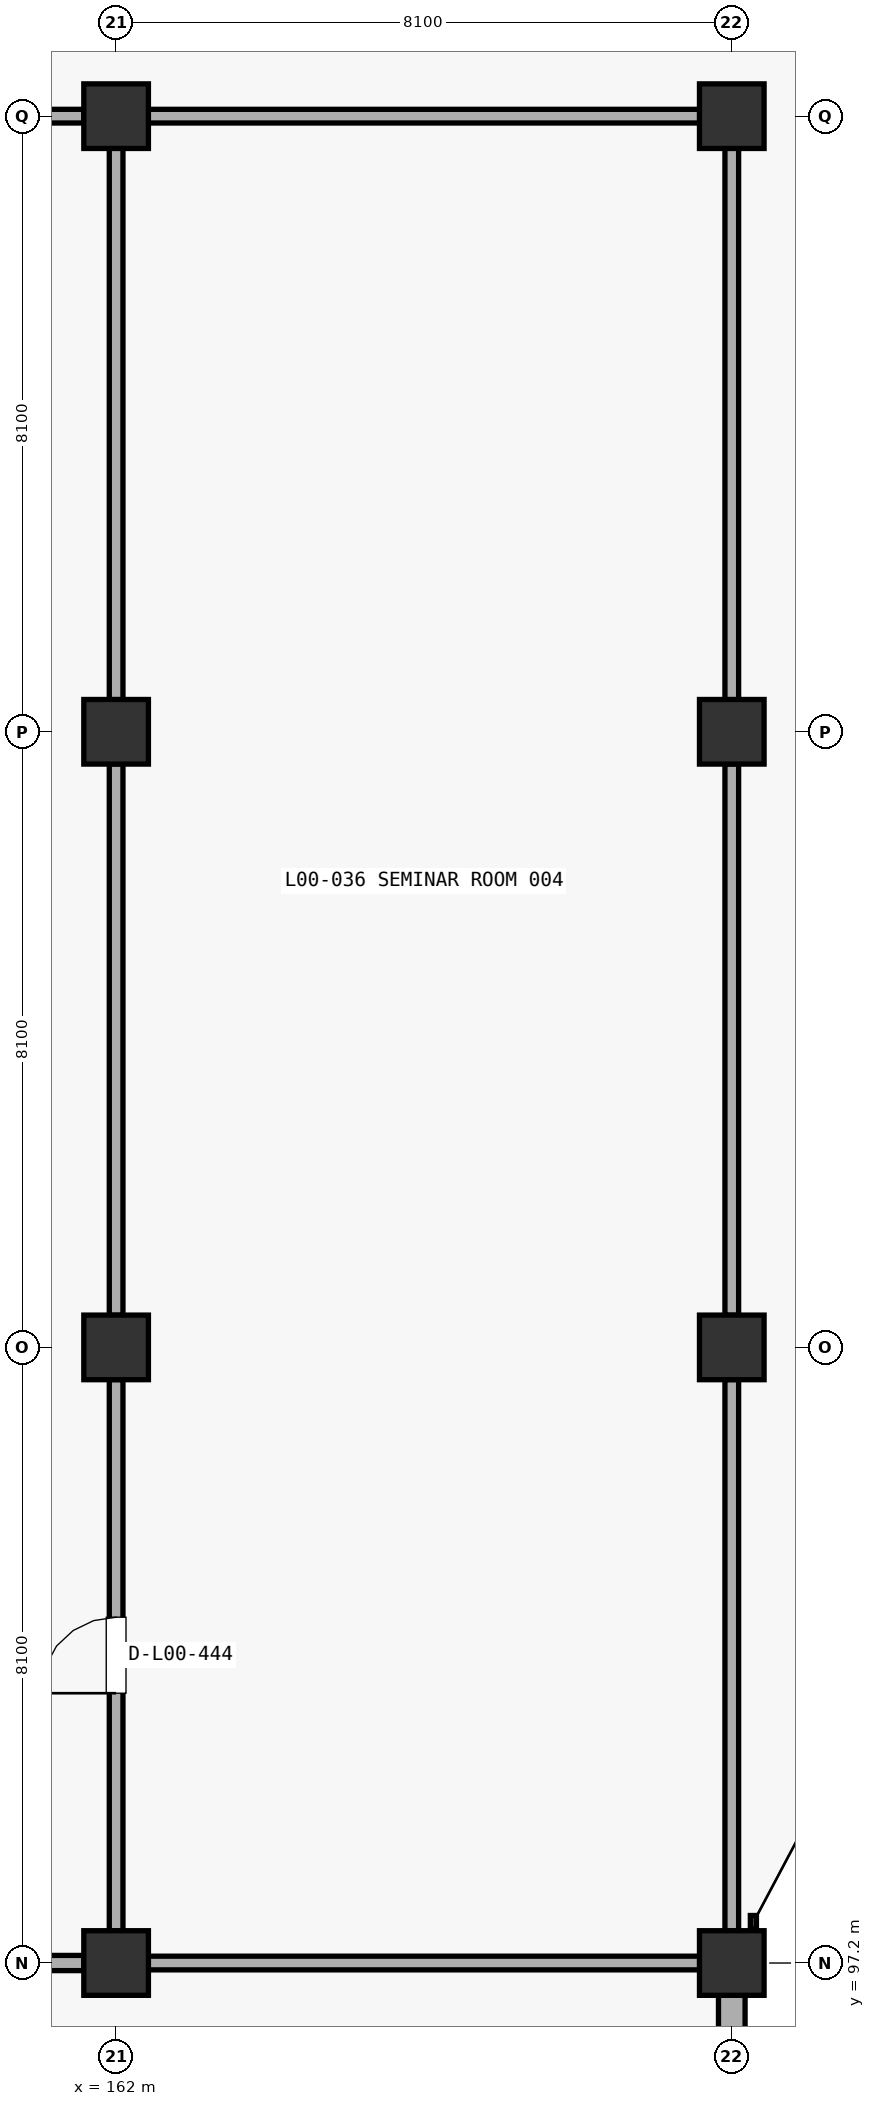
"""IFC4 building model, lengths in metres.
Left out: names, types, materials, properties, quantities, classifications, styles, units other than length and angle.
Written with IfcOpenShell. Run it as: python <this file> out.ifc"""

import sys

from ifc_helpers import new_model, si_unit, direction, frame, frame_2d, origin, origin_2d, place, context, subcontext, project, spatial, rectangle, extrude, element, fill, save


model = new_model("IFC4")
c1 = context("Model", 3, precision=1e-05, world=origin(), true_north=direction((0.0, 1.0)))
c2 = subcontext(c1, "Body", "Model", "MODEL_VIEW")
j1 = project(units=[si_unit("LENGTHUNIT", "METRE"), si_unit("PLANEANGLEUNIT", "RADIAN")], contexts=[c1])
p1 = place(None, origin())
s1 = spatial("IfcSite", under=j1, at=p1, CompositionType="ELEMENT")
p2 = place(p1, origin())
s2 = spatial("IfcBuilding", under=s1, at=p2, CompositionType="ELEMENT")
p3 = place(p2, origin())
s3 = spatial("IfcBuildingStorey", under=s2, at=p3, CompositionType="ELEMENT", Elevation=0.0)
for number, where, z_axis, x_axis in (
    (1, (162.0, 97.2, 0.0), (0.0, 0.0, 1.0), (1.0, 0.0, 0.0)),
    (2, (162.0, 105.3, 0.0), (0.0, 0.0, 1.0), (1.0, 0.0, 0.0)),
    (3, (162.0, 113.4, 0.0), (0.0, 0.0, 1.0), (1.0, 0.0, 0.0)),
    (4, (162.0, 121.5, 0.0), (0.0, 0.0, 1.0), (1.0, 0.0, 0.0)),
    (5, (170.1, 97.2, 0.0), (0.0, 0.0, 1.0), (1.0, 0.0, 0.0)),
    (6, (170.1, 105.3, 0.0), (0.0, 0.0, 1.0), (1.0, 0.0, 0.0)),
    (7, (170.1, 113.4, 0.0), (0.0, 0.0, 1.0), (1.0, 0.0, 0.0)),
    (8, (170.1, 121.5, 0.0), (0.0, 0.0, 1.0), (1.0, 0.0, 0.0)),
):
    element("IfcColumn", number, at=place(p3, frame(where, z_axis=z_axis, x_axis=x_axis)), inside=s3, PredefinedType="COLUMN", context=c2, shape_type="SweptSolid", body=[
        extrude(rectangle(XDim=0.85, YDim=0.85, at=origin_2d()), origin(), (0.0, 0.0, 1.0), 5.1),
    ])
p4 = place(p3, frame((170.1, 89.523, 0.0), z_axis=(0.0, 0.0, 1.0), x_axis=(0.0, 1.0, 0.0)))
e9 = element("IfcWall", 9, at=p4, inside=s3, PredefinedType="STANDARD", context=c2, shape_type="SweptSolid", body=[
    extrude(rectangle(XDim=7.254, YDim=0.35, at=frame_2d((3.627, 0.0))), origin(), (0.0, 0.0, 1.0), 4.172),
])
p5 = place(p4, frame((4.627, 0.0, 0.0), z_axis=(0.0, 0.0, 1.0), x_axis=(-1.0, 0.0, 0.0)))
e10 = element("IfcOpeningElement", 10, at=p5, cuts=e9, PredefinedType="OPENING", context=c2, shape_type="SweptSolid", body=[
    extrude(rectangle(XDim=2.0, YDim=2.2, at=frame_2d((1.0, 1.1))), frame((0.0, 0.185, 0.0), z_axis=(0.0, -1.0, 0.0), x_axis=(1.0, 0.0, 0.0)), (0.0, 0.0, 1.0), 0.37),
])
p6 = place(p3, frame((162.0, 97.623, 0.0), z_axis=(0.0, 0.0, 1.0), x_axis=(0.0, 1.0, 0.0)))
e11 = element("IfcWall", 11, at=p6, inside=s3, PredefinedType="PARTITIONING", context=c2, shape_type="SweptSolid", body=[
    extrude(rectangle(XDim=7.254, YDim=0.18, at=frame_2d((3.627, 0.0))), origin(), (0.0, 0.0, 1.0), 3.972),
])
p7 = place(p6, frame((3.127, 0.0, 0.0)))
e12 = element("IfcOpeningElement", 12, at=p7, cuts=e11, PredefinedType="OPENING", context=c2, shape_type="SweptSolid", body=[
    extrude(rectangle(XDim=1.0, YDim=2.15, at=frame_2d((0.5, 1.075))), frame((0.0, 0.1, 0.0), z_axis=(0.0, -1.0, 0.0), x_axis=(1.0, 0.0, 0.0)), (0.0, 0.0, 1.0), 0.2),
])
p8 = place(p3, frame((162.0, 105.723, 0.0), z_axis=(0.0, 0.0, 1.0), x_axis=(0.0, 1.0, 0.0)))
e13 = element("IfcWall", 13, at=p8, inside=s3, PredefinedType="PARTITIONING", context=c2, shape_type="SweptSolid", body=[
    extrude(rectangle(XDim=7.254, YDim=0.18, at=frame_2d((3.627, 0.0))), origin(), (0.0, 0.0, 1.0), 3.872),
])
p9 = place(p3, frame((162.0, 113.823, 0.0), z_axis=(0.0, 0.0, 1.0), x_axis=(0.0, 1.0, 0.0)))
e14 = element("IfcWall", 14, at=p9, inside=s3, PredefinedType="PARTITIONING", context=c2, shape_type="SweptSolid", body=[
    extrude(rectangle(XDim=7.254, YDim=0.18, at=frame_2d((3.627, 0.0))), origin(), (0.0, 0.0, 1.0), 4.072),
])
p10 = place(p3, frame((162.423, 121.5, 0.0), z_axis=(0.0, 0.0, 1.0), x_axis=(1.0, 0.0, 0.0)))
e15 = element("IfcWall", 15, at=p10, inside=s3, PredefinedType="PARTITIONING", context=c2, shape_type="SweptSolid", body=[
    extrude(rectangle(XDim=7.254, YDim=0.18, at=frame_2d((3.627, 0.0))), origin(), (0.0, 0.0, 1.0), 4.172),
])
p11 = place(p3, frame((162.423, 97.2, 0.0), z_axis=(0.0, 0.0, 1.0), x_axis=(1.0, 0.0, 0.0)))
e16 = element("IfcWall", 16, at=p11, inside=s3, PredefinedType="PARTITIONING", context=c2, shape_type="SweptSolid", body=[
    extrude(rectangle(XDim=7.254, YDim=0.18, at=frame_2d((3.627, 0.0))), origin(), (0.0, 0.0, 1.0), 3.972),
])
p12 = place(p3, frame((170.1, 97.623, 0.0), z_axis=(0.0, 0.0, 1.0), x_axis=(0.0, 1.0, 0.0)))
e17 = element("IfcWall", 17, at=p12, inside=s3, PredefinedType="PARTITIONING", context=c2, shape_type="SweptSolid", body=[
    extrude(rectangle(XDim=7.254, YDim=0.18, at=frame_2d((3.627, 0.0))), origin(), (0.0, 0.0, 1.0), 4.072),
])
p13 = place(p3, frame((170.1, 105.723, 0.0), z_axis=(0.0, 0.0, 1.0), x_axis=(0.0, 1.0, 0.0)))
e18 = element("IfcWall", 18, at=p13, inside=s3, PredefinedType="PARTITIONING", context=c2, shape_type="SweptSolid", body=[
    extrude(rectangle(XDim=7.254, YDim=0.18, at=frame_2d((3.627, 0.0))), origin(), (0.0, 0.0, 1.0), 4.172),
])
p14 = place(p3, frame((170.1, 113.823, 0.0), z_axis=(0.0, 0.0, 1.0), x_axis=(0.0, 1.0, 0.0)))
e19 = element("IfcWall", 19, at=p14, inside=s3, PredefinedType="PARTITIONING", context=c2, shape_type="SweptSolid", body=[
    extrude(rectangle(XDim=7.254, YDim=0.18, at=frame_2d((3.627, 0.0))), origin(), (0.0, 0.0, 1.0), 4.222),
])
p15 = place(p3, frame((154.323, 121.5, 0.0), z_axis=(0.0, 0.0, 1.0), x_axis=(1.0, 0.0, 0.0)))
e20 = element("IfcWall", 20, at=p15, inside=s3, PredefinedType="PARTITIONING", context=c2, shape_type="SweptSolid", body=[
    extrude(rectangle(XDim=7.254, YDim=0.18, at=frame_2d((3.627, 0.0))), origin(), (0.0, 0.0, 1.0), 4.072),
])
p16 = place(p15, frame((2.727, 0.0, 0.0)))
e21 = element("IfcOpeningElement", 21, at=p16, cuts=e20, PredefinedType="OPENING", context=c2, shape_type="SweptSolid", body=[
    extrude(rectangle(XDim=1.8, YDim=2.2, at=frame_2d((0.9, 1.1))), frame((0.0, 0.1, 0.0), z_axis=(0.0, -1.0, 0.0), x_axis=(1.0, 0.0, 0.0)), (0.0, 0.0, 1.0), 0.2),
])
p17 = place(p3, frame((154.323, 97.2, 0.0), z_axis=(0.0, 0.0, 1.0), x_axis=(1.0, 0.0, 0.0)))
e22 = element("IfcWall", 22, at=p17, inside=s3, PredefinedType="PARTITIONING", context=c2, shape_type="SweptSolid", body=[
    extrude(rectangle(XDim=7.254, YDim=0.2, at=frame_2d((3.627, 0.0))), origin(), (0.0, 0.0, 1.0), 4.222),
])
p18 = place(p17, frame((2.727, 0.0, 0.0)))
e23 = element("IfcOpeningElement", 23, at=p18, cuts=e22, PredefinedType="OPENING", context=c2, shape_type="SweptSolid", body=[
    extrude(rectangle(XDim=1.8, YDim=2.2, at=frame_2d((0.9, 1.1))), frame((0.0, 0.11, 0.0), z_axis=(0.0, -1.0, 0.0), x_axis=(1.0, 0.0, 0.0)), (0.0, 0.0, 1.0), 0.22),
])
p19 = place(p7, origin())
e24 = element("IfcDoor", 24, at=p19, inside=s3, OperationType="SINGLE_SWING_LEFT", PredefinedType="DOOR", context=c2, shape_type="SweptSolid", body=[
    extrude(rectangle(XDim=1.0, YDim=2.15, at=frame_2d((0.5, 1.075))), frame((0.0, 0.025, 0.0), z_axis=(0.0, -1.0, 0.0), x_axis=(1.0, 0.0, 0.0)), (0.0, 0.0, 1.0), 0.05),
])
fill(e12, e24)
save(model, sys.argv[1])
